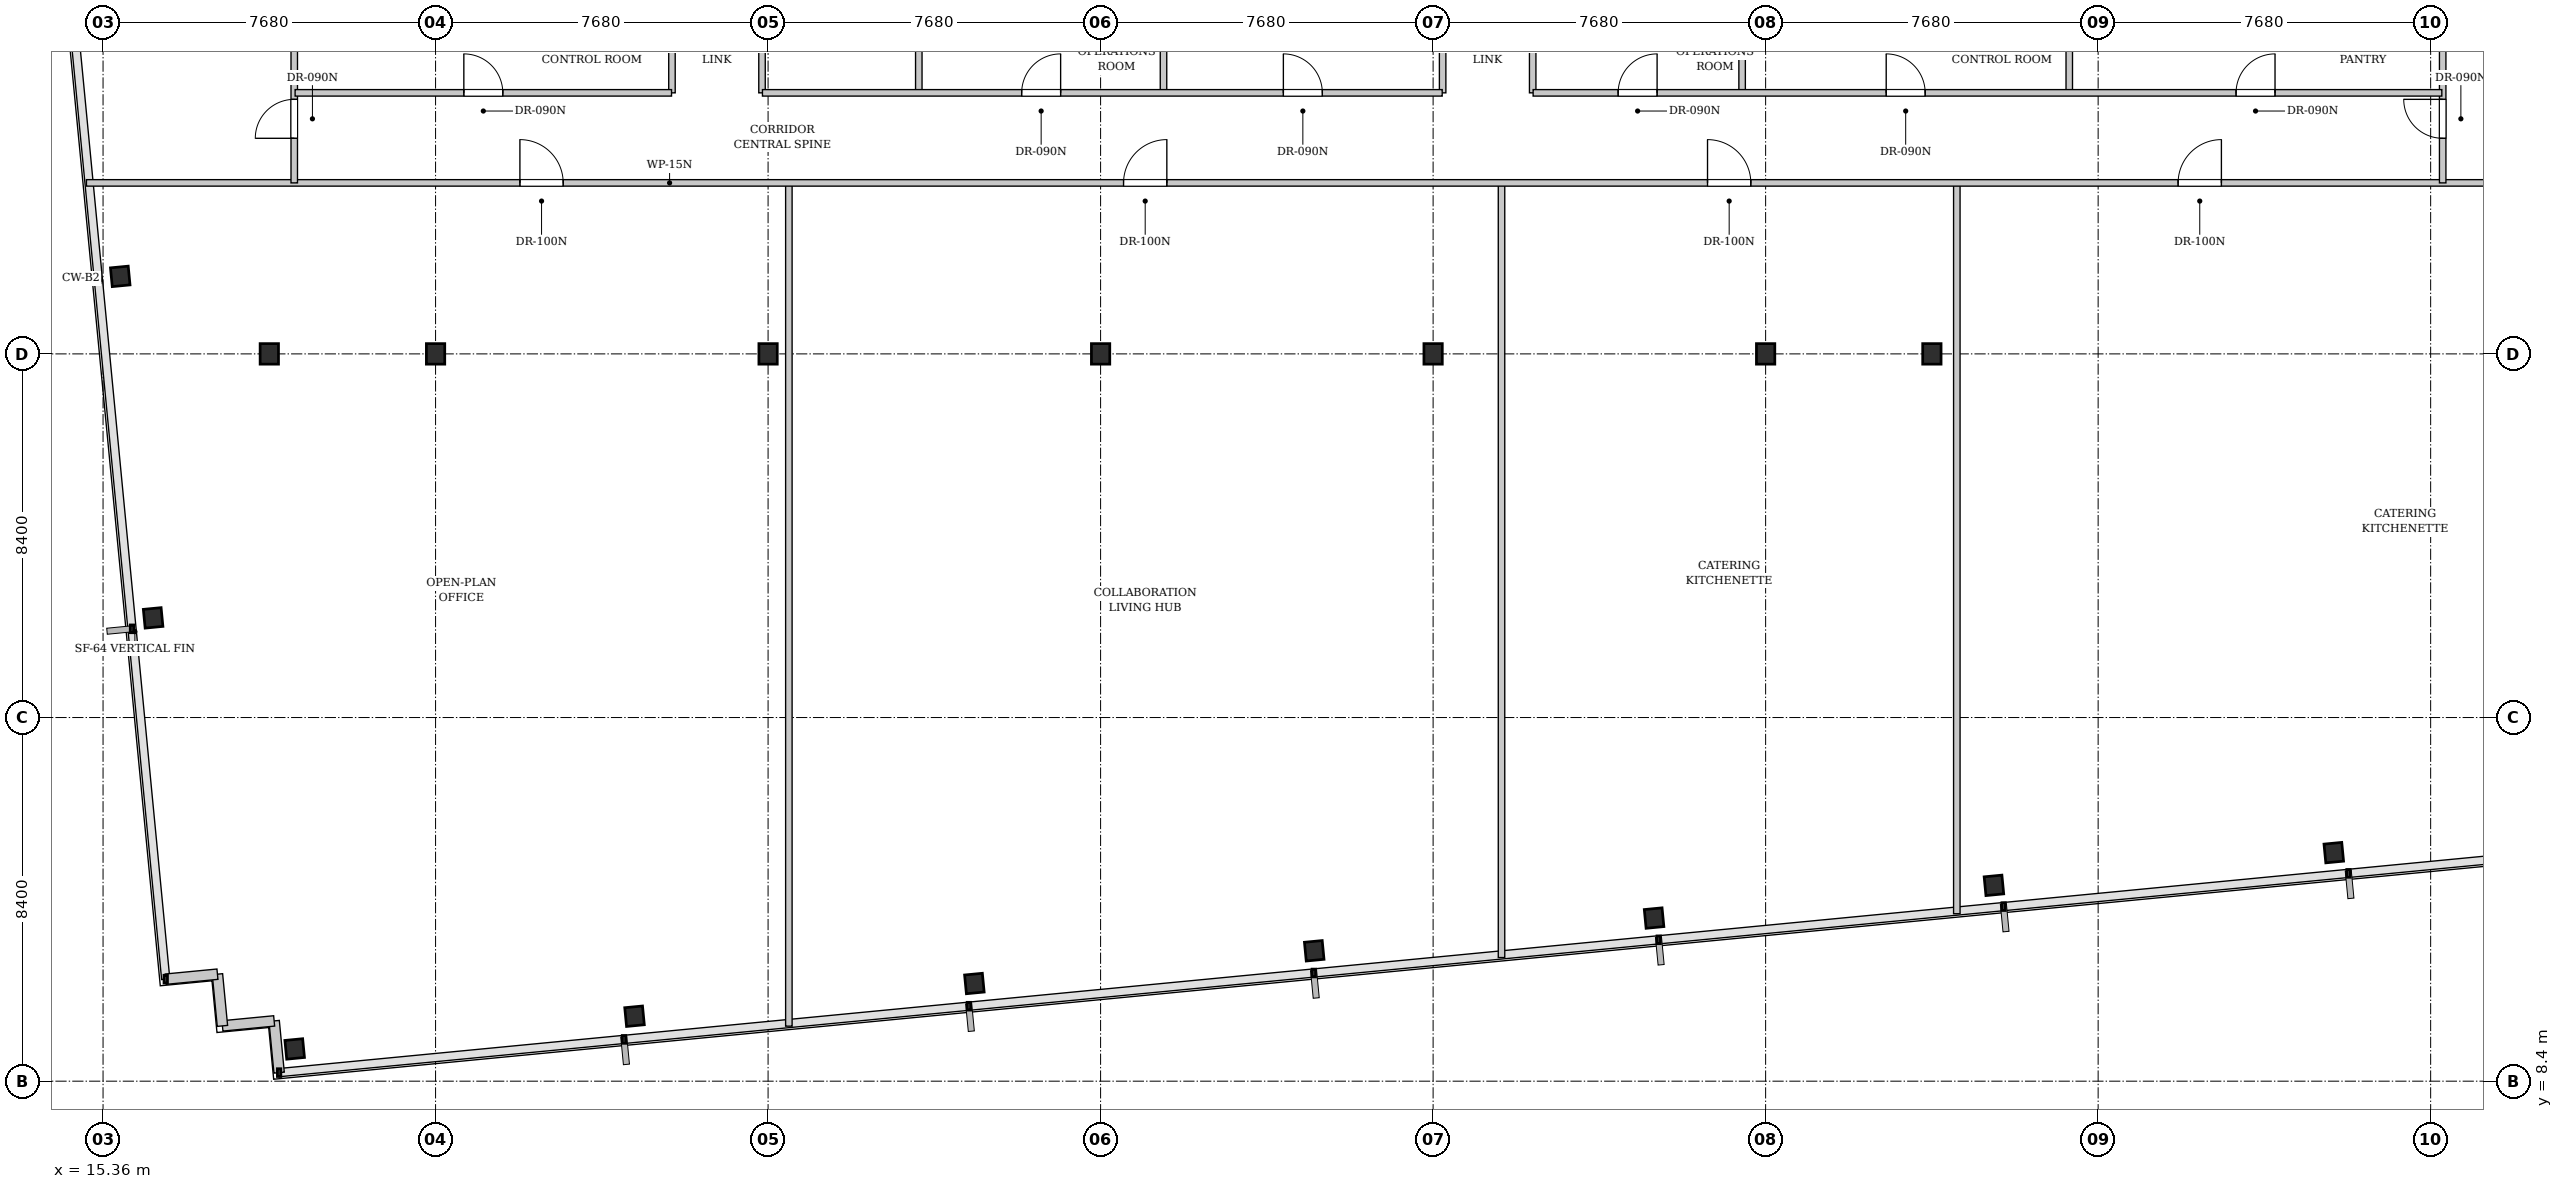
"""IFC4 building model, lengths in metres.
Left out: names, types, materials, properties, quantities, classifications, styles, units other than length and angle.
Written with IfcOpenShell. Run it as: python <this file> out.ifc"""

import sys

from ifc_helpers import new_model, si_unit, direction, frame, frame_2d, origin, origin_2d, place, context, subcontext, project, spatial, rectangle, i_section, extrude, element, fill, save


model = new_model("IFC4")
c1 = context("Model", 3, precision=1e-05, world=origin(), true_north=direction((0.0, 1.0)))
c2 = subcontext(c1, "Body", "Model", "MODEL_VIEW")
j1 = project(units=[si_unit("LENGTHUNIT", "METRE"), si_unit("PLANEANGLEUNIT", "RADIAN")], contexts=[c1])
p1 = place(None, origin())
s1 = spatial("IfcSite", under=j1, at=p1, CompositionType="ELEMENT")
p2 = place(p1, origin())
s2 = spatial("IfcBuilding", under=s1, at=p2, CompositionType="ELEMENT")
p3 = place(p2, frame((0.0, 0.0, 113.5)))
s3 = spatial("IfcBuildingStorey", under=s2, at=p3, CompositionType="ELEMENT", Elevation=113.5)
for number, where, z_axis, x_axis in (
    (1, (23.04, 25.2, 0.0), (0.0, 0.0, 1.0), (1.0, 0.0, 0.0)),
    (2, (30.72, 25.2, 0.0), (0.0, 0.0, 1.0), (1.0, 0.0, 0.0)),
    (3, (38.4, 25.2, 0.0), (0.0, 0.0, 1.0), (1.0, 0.0, 0.0)),
    (4, (46.08, 25.2, 0.0), (0.0, 0.0, 1.0), (1.0, 0.0, 0.0)),
    (5, (53.76, 25.2, 0.0), (0.0, 0.0, 1.0), (1.0, 0.0, 0.0)),
    (6, (19.2, 25.2, 0.0), (0.0, 0.0, 1.0), (1.0, 0.0, 0.0)),
    (7, (57.6, 25.2, 0.0), (0.0, 0.0, 1.0), (1.0, 0.0, 0.0)),
):
    element("IfcColumn", number, at=place(p3, frame(where, z_axis=z_axis, x_axis=x_axis)), inside=s3, PredefinedType="COLUMN", context=c2, shape_type="SweptSolid", body=[
        extrude(i_section(OverallWidth=0.424, OverallDepth=0.474, WebThickness=0.047, FlangeThickness=0.077, FilletRadius=0.015, at=origin_2d()), origin(), (0.0, 0.0, 1.0), 3.4),
    ])
for number, where, z_axis, x_axis in (
    (8, (19.786, 9.144, 0.0), (0.0, 0.0, 1.0), (0.995, 0.096, 0.0)),
    (9, (27.635, 9.9, 0.0), (0.0, 0.0, 1.0), (0.995, 0.096, 0.0)),
    (10, (35.485, 10.656, 0.0), (0.0, 0.0, 1.0), (0.995, 0.096, 0.0)),
    (11, (43.334, 11.412, 0.0), (0.0, 0.0, 1.0), (0.995, 0.096, 0.0)),
    (12, (51.184, 12.167, 0.0), (0.0, 0.0, 1.0), (0.995, 0.096, 0.0)),
    (13, (59.033, 12.923, 0.0), (0.0, 0.0, 1.0), (0.995, 0.096, 0.0)),
    (14, (66.883, 13.679, 0.0), (0.0, 0.0, 1.0), (0.995, 0.096, 0.0)),
    (15, (16.517, 19.102, 0.0), (0.0, 0.0, 1.0), (0.995, 0.096, 0.0)),
    (16, (15.757, 26.99, 0.0), (0.0, 0.0, 1.0), (0.995, 0.096, 0.0)),
):
    element("IfcColumn", number, at=place(p3, frame(where, z_axis=z_axis, x_axis=x_axis)), inside=s3, PredefinedType="COLUMN", context=c2, shape_type="SweptSolid", body=[
        extrude(i_section(OverallWidth=0.412, OverallDepth=0.435, WebThickness=0.036, FlangeThickness=0.058, FilletRadius=0.015, at=origin_2d()), origin(), (0.0, 0.0, 1.0), 3.4),
    ])
for number, where, z_axis, x_axis in (
    (17, (19.427, 8.597, 0.0), (0.0, 0.0, 1.0), (-0.096, 0.995, 0.0)),
    (18, (19.312, 9.792, 0.0), (0.0, 0.0, 1.0), (-0.995, -0.096, 0.0)),
):
    element("IfcWall", number, at=place(p3, frame(where, z_axis=z_axis, x_axis=x_axis)), inside=s3, PredefinedType="SOLIDWALL", context=c2, shape_type="SweptSolid", body=[
        extrude(rectangle(XDim=1.2, YDim=0.24, at=frame_2d((0.6, 0.0))), origin(), (0.0, 0.0, 1.0), 3.18),
    ])
p4 = place(p3, frame((18.117, 9.677, 0.0), z_axis=(0.0, 0.0, 1.0), x_axis=(-0.095836473879, 0.995397091755, 0.0)))
e19 = element("IfcWall", 19, at=p4, inside=s3, PredefinedType="SOLIDWALL", context=c2, shape_type="SweptSolid", body=[
    extrude(rectangle(XDim=1.2, YDim=0.24, at=frame_2d((0.6, 0.0))), origin(), (0.0, 0.0, 1.0), 3.18),
])
p5 = place(p3, frame((18.002, 10.871, 0.0), z_axis=(0.0, 0.0, 1.0), x_axis=(-0.995398960025, -0.095817067274, 0.0)))
e20 = element("IfcWall", 20, at=p5, inside=s3, PredefinedType="SOLIDWALL", context=c2, shape_type="SweptSolid", body=[
    extrude(rectangle(XDim=1.2, YDim=0.24, at=frame_2d((0.6, 0.0))), origin(), (0.0, 0.0, 1.0), 3.18),
])
p6 = place(p3, frame((31.2, 9.671, 0.0), z_axis=(0.0, 0.0, 1.0), x_axis=(0.0, 1.0, 0.0)))
e21 = element("IfcWall", 21, at=p6, inside=s3, PredefinedType="PARTITIONING", context=c2, shape_type="SweptSolid", body=[
    extrude(rectangle(XDim=19.499, YDim=0.15, at=frame_2d((9.75, 0.0))), origin(), (0.0, 0.0, 1.0), 3.18),
])
p7 = place(p3, frame((47.66, 11.256, 0.0), z_axis=(0.0, 0.0, 1.0), x_axis=(0.0, 1.0, 0.0)))
e22 = element("IfcWall", 22, at=p7, inside=s3, PredefinedType="PARTITIONING", context=c2, shape_type="SweptSolid", body=[
    extrude(rectangle(XDim=17.914, YDim=0.15, at=frame_2d((8.957, 0.0))), origin(), (0.0, 0.0, 1.0), 3.18),
])
p8 = place(p3, frame((58.176, 12.268, 0.0), z_axis=(0.0, 0.0, 1.0), x_axis=(0.0, 1.0, 0.0)))
e23 = element("IfcWall", 23, at=p8, inside=s3, PredefinedType="PARTITIONING", context=c2, shape_type="SweptSolid", body=[
    extrude(rectangle(XDim=16.902, YDim=0.15, at=frame_2d((8.451, 0.0))), origin(), (0.0, 0.0, 1.0), 2.525),
])
p9 = place(p3, frame((14.976, 29.15, 0.0), z_axis=(0.0, 0.0, 1.0), x_axis=(1.0, 0.0, 0.0)))
e24 = element("IfcWall", 24, at=p9, inside=s3, PredefinedType="PARTITIONING", context=c2, shape_type="SweptSolid", body=[
    extrude(rectangle(XDim=61.222, YDim=0.15, at=frame_2d((30.611, 0.0))), origin(), (0.0, 0.0, 1.0), 2.525),
])
p10 = place(p9, frame((10.012, 0.0, 0.0)))
e25 = element("IfcOpeningElement", 25, at=p10, cuts=e24, PredefinedType="OPENING", context=c2, shape_type="SweptSolid", body=[
    extrude(rectangle(XDim=1.0, YDim=2.15, at=frame_2d((0.5, 1.075))), frame((0.0, 0.085, 0.0), z_axis=(0.0, -1.0, 0.0), x_axis=(1.0, 0.0, 0.0)), (0.0, 0.0, 1.0), 0.17),
])
p11 = place(p9, frame((23.954, 0.0, 0.0)))
e26 = element("IfcOpeningElement", 26, at=p11, cuts=e24, PredefinedType="OPENING", context=c2, shape_type="SweptSolid", body=[
    extrude(rectangle(XDim=1.0, YDim=2.15, at=frame_2d((0.5, 1.075))), frame((0.0, 0.085, 0.0), z_axis=(0.0, -1.0, 0.0), x_axis=(1.0, 0.0, 0.0)), (0.0, 0.0, 1.0), 0.17),
])
p12 = place(p9, frame((37.442, 0.0, 0.0)))
e27 = element("IfcOpeningElement", 27, at=p12, cuts=e24, PredefinedType="OPENING", context=c2, shape_type="SweptSolid", body=[
    extrude(rectangle(XDim=1.0, YDim=2.15, at=frame_2d((0.5, 1.075))), frame((0.0, 0.085, 0.0), z_axis=(0.0, -1.0, 0.0), x_axis=(1.0, 0.0, 0.0)), (0.0, 0.0, 1.0), 0.17),
])
p13 = place(p9, frame((48.311, 0.0, 0.0)))
e28 = element("IfcOpeningElement", 28, at=p13, cuts=e24, PredefinedType="OPENING", context=c2, shape_type="SweptSolid", body=[
    extrude(rectangle(XDim=1.0, YDim=2.15, at=frame_2d((0.5, 1.075))), frame((0.0, 0.085, 0.0), z_axis=(0.0, -1.0, 0.0), x_axis=(1.0, 0.0, 0.0)), (0.0, 0.0, 1.0), 0.17),
])
p14 = place(p3, frame((19.776, 29.15, 0.0), z_axis=(0.0, 0.0, 1.0), x_axis=(0.0, 1.0, 0.0)))
e29 = element("IfcWall", 29, at=p14, inside=s3, PredefinedType="PARTITIONING", context=c2, shape_type="SweptSolid", body=[
    extrude(rectangle(XDim=17.034, YDim=0.15, at=frame_2d((8.517, 0.0))), origin(), (0.0, 0.0, 1.0), 3.18),
])
p15 = place(p14, frame((1.03, 0.0, 0.0)))
e30 = element("IfcOpeningElement", 30, at=p15, cuts=e29, PredefinedType="OPENING", context=c2, shape_type="SweptSolid", body=[
    extrude(rectangle(XDim=0.9, YDim=2.15, at=frame_2d((0.45, 1.075))), frame((0.0, 0.085, 0.0), z_axis=(0.0, -1.0, 0.0), x_axis=(1.0, 0.0, 0.0)), (0.0, 0.0, 1.0), 0.17),
])
p16 = place(p3, frame((69.398, 29.15, 0.0), z_axis=(0.0, 0.0, 1.0), x_axis=(0.0, 1.0, 0.0)))
e31 = element("IfcWall", 31, at=p16, inside=s3, PredefinedType="PARTITIONING", context=c2, shape_type="SweptSolid", body=[
    extrude(rectangle(XDim=21.812, YDim=0.15, at=frame_2d((10.906, 0.0))), origin(), (0.0, 0.0, 1.0), 3.18),
])
p17 = place(p16, frame((1.03, 0.0, 0.0)))
e32 = element("IfcOpeningElement", 32, at=p17, cuts=e31, PredefinedType="OPENING", context=c2, shape_type="SweptSolid", body=[
    extrude(rectangle(XDim=0.9, YDim=2.15, at=frame_2d((0.45, 1.075))), frame((0.0, 0.085, 0.0), z_axis=(0.0, -1.0, 0.0), x_axis=(1.0, 0.0, 0.0)), (0.0, 0.0, 1.0), 0.17),
])
p18 = place(p3, frame((28.5, 31.23, 0.0), z_axis=(0.0, 0.0, 1.0), x_axis=(0.0, 1.0, 0.0)))
e33 = element("IfcWall", 33, at=p18, inside=s3, PredefinedType="PARTITIONING", context=c2, shape_type="SweptSolid", body=[
    extrude(rectangle(XDim=1.82, YDim=0.15, at=frame_2d((0.91, 0.0))), origin(), (0.0, 0.0, 1.0), 3.18),
])
for number, where, z_axis, x_axis in (
    (34, (30.58, 31.23, 0.0), (0.0, 0.0, 1.0), (0.0, 1.0, 0.0)),
    (35, (46.3, 31.23, 0.0), (0.0, 0.0, 1.0), (0.0, 1.0, 0.0)),
):
    element("IfcWall", number, at=place(p3, frame(where, z_axis=z_axis, x_axis=x_axis)), inside=s3, PredefinedType="PARTITIONING", context=c2, shape_type="SweptSolid", body=[
        extrude(rectangle(XDim=1.82, YDim=0.15, at=frame_2d((0.91, 0.0))), origin(), (0.0, 0.0, 1.0), 2.525),
    ])
p19 = place(p3, frame((48.38, 31.23, 0.0), z_axis=(0.0, 0.0, 1.0), x_axis=(0.0, 1.0, 0.0)))
e36 = element("IfcWall", 36, at=p19, inside=s3, PredefinedType="PARTITIONING", context=c2, shape_type="SweptSolid", body=[
    extrude(rectangle(XDim=1.82, YDim=0.15, at=frame_2d((0.91, 0.0))), origin(), (0.0, 0.0, 1.0), 3.18),
])
p20 = place(p3, frame((19.796, 31.23, 0.0), z_axis=(0.0, 0.0, 1.0), x_axis=(1.0, 0.0, 0.0)))
e37 = element("IfcWall", 37, at=p20, inside=s3, PredefinedType="PARTITIONING", context=c2, shape_type="SweptSolid", body=[
    extrude(rectangle(XDim=8.694, YDim=0.15, at=frame_2d((4.347, 0.0))), origin(), (0.0, 0.0, 1.0), 3.18),
])
p21 = place(p20, frame((3.897, 0.0, 0.0)))
e38 = element("IfcOpeningElement", 38, at=p21, cuts=e37, PredefinedType="OPENING", context=c2, shape_type="SweptSolid", body=[
    extrude(rectangle(XDim=0.9, YDim=2.15, at=frame_2d((0.45, 1.075))), frame((0.0, 0.085, 0.0), z_axis=(0.0, -1.0, 0.0), x_axis=(1.0, 0.0, 0.0)), (0.0, 0.0, 1.0), 0.17),
])
for number, where, z_axis, x_axis in (
    (39, (34.201, 31.23, 0.0), (0.0, 0.0, 1.0), (0.0, 1.0, 0.0)),
    (40, (39.853, 31.23, 0.0), (0.0, 0.0, 1.0), (0.0, 1.0, 0.0)),
):
    element("IfcWall", number, at=place(p3, frame(where, z_axis=z_axis, x_axis=x_axis)), inside=s3, PredefinedType="PARTITIONING", context=c2, shape_type="SweptSolid", body=[
        extrude(rectangle(XDim=1.82, YDim=0.15, at=frame_2d((0.91, 0.0))), origin(), (0.0, 0.0, 1.0), 3.18),
    ])
p22 = place(p3, frame((30.59, 31.23, 0.0), z_axis=(0.0, 0.0, 1.0), x_axis=(1.0, 0.0, 0.0)))
e41 = element("IfcWall", 41, at=p22, inside=s3, PredefinedType="PARTITIONING", context=c2, shape_type="SweptSolid", body=[
    extrude(rectangle(XDim=15.7, YDim=0.15, at=frame_2d((7.85, 0.0))), origin(), (0.0, 0.0, 1.0), 3.18),
])
p23 = place(p22, frame((5.987, 0.0, 0.0)))
e42 = element("IfcOpeningElement", 42, at=p23, cuts=e41, PredefinedType="OPENING", context=c2, shape_type="SweptSolid", body=[
    extrude(rectangle(XDim=0.9, YDim=2.15, at=frame_2d((0.45, 1.075))), frame((0.0, 0.085, 0.0), z_axis=(0.0, -1.0, 0.0), x_axis=(1.0, 0.0, 0.0)), (0.0, 0.0, 1.0), 0.17),
])
p24 = place(p22, frame((12.031, 0.0, 0.0)))
e43 = element("IfcOpeningElement", 43, at=p24, cuts=e41, PredefinedType="OPENING", context=c2, shape_type="SweptSolid", body=[
    extrude(rectangle(XDim=0.9, YDim=2.15, at=frame_2d((0.45, 1.075))), frame((0.0, 0.085, 0.0), z_axis=(0.0, -1.0, 0.0), x_axis=(1.0, 0.0, 0.0)), (0.0, 0.0, 1.0), 0.17),
])
for number, where, z_axis, x_axis in (
    (44, (53.217, 31.23, 0.0), (0.0, 0.0, 1.0), (0.0, 1.0, 0.0)),
    (45, (60.773, 31.23, 0.0), (0.0, 0.0, 1.0), (0.0, 1.0, 0.0)),
):
    element("IfcWall", number, at=place(p3, frame(where, z_axis=z_axis, x_axis=x_axis)), inside=s3, PredefinedType="PARTITIONING", context=c2, shape_type="SweptSolid", body=[
        extrude(rectangle(XDim=1.82, YDim=0.15, at=frame_2d((0.91, 0.0))), origin(), (0.0, 0.0, 1.0), 3.18),
    ])
p25 = place(p3, frame((48.39, 31.23, 0.0), z_axis=(0.0, 0.0, 1.0), x_axis=(1.0, 0.0, 0.0)))
e46 = element("IfcWall", 46, at=p25, inside=s3, PredefinedType="PARTITIONING", context=c2, shape_type="SweptSolid", body=[
    extrude(rectangle(XDim=20.988, YDim=0.15, at=frame_2d((10.494, 0.0))), origin(), (0.0, 0.0, 1.0), 2.525),
])
p26 = place(p25, frame((1.963, 0.0, 0.0)))
e47 = element("IfcOpeningElement", 47, at=p26, cuts=e46, PredefinedType="OPENING", context=c2, shape_type="SweptSolid", body=[
    extrude(rectangle(XDim=0.9, YDim=2.15, at=frame_2d((0.45, 1.075))), frame((0.0, 0.085, 0.0), z_axis=(0.0, -1.0, 0.0), x_axis=(1.0, 0.0, 0.0)), (0.0, 0.0, 1.0), 0.17),
])
p27 = place(p25, frame((8.155, 0.0, 0.0)))
e48 = element("IfcOpeningElement", 48, at=p27, cuts=e46, PredefinedType="OPENING", context=c2, shape_type="SweptSolid", body=[
    extrude(rectangle(XDim=0.9, YDim=2.15, at=frame_2d((0.45, 1.075))), frame((0.0, 0.085, 0.0), z_axis=(0.0, -1.0, 0.0), x_axis=(1.0, 0.0, 0.0)), (0.0, 0.0, 1.0), 0.17),
])
p28 = place(p25, frame((16.236, 0.0, 0.0)))
e49 = element("IfcOpeningElement", 49, at=p28, cuts=e46, PredefinedType="OPENING", context=c2, shape_type="SweptSolid", body=[
    extrude(rectangle(XDim=0.9, YDim=2.15, at=frame_2d((0.45, 1.075))), frame((0.0, 0.085, 0.0), z_axis=(0.0, -1.0, 0.0), x_axis=(1.0, 0.0, 0.0)), (0.0, 0.0, 1.0), 0.17),
])
p29 = place(p10, origin())
e50 = element("IfcDoor", 50, at=p29, inside=s3, OperationType="SINGLE_SWING_LEFT", PredefinedType="DOOR", context=c2, shape_type="SweptSolid", body=[
    extrude(rectangle(XDim=1.0, YDim=2.15, at=frame_2d((0.5, 1.075))), frame((0.0, 0.025, 0.0), z_axis=(0.0, -1.0, 0.0), x_axis=(1.0, 0.0, 0.0)), (0.0, 0.0, 1.0), 0.05),
])
fill(e25, e50)
p30 = place(p11, origin())
e51 = element("IfcDoor", 51, at=p30, inside=s3, OperationType="SINGLE_SWING_RIGHT", PredefinedType="DOOR", context=c2, shape_type="SweptSolid", body=[
    extrude(rectangle(XDim=1.0, YDim=2.15, at=frame_2d((0.5, 1.075))), frame((0.0, 0.025, 0.0), z_axis=(0.0, -1.0, 0.0), x_axis=(1.0, 0.0, 0.0)), (0.0, 0.0, 1.0), 0.05),
])
fill(e26, e51)
p31 = place(p12, origin())
e52 = element("IfcDoor", 52, at=p31, inside=s3, OperationType="SINGLE_SWING_LEFT", PredefinedType="DOOR", context=c2, shape_type="SweptSolid", body=[
    extrude(rectangle(XDim=1.0, YDim=2.15, at=frame_2d((0.5, 1.075))), frame((0.0, 0.025, 0.0), z_axis=(0.0, -1.0, 0.0), x_axis=(1.0, 0.0, 0.0)), (0.0, 0.0, 1.0), 0.05),
])
fill(e27, e52)
p32 = place(p13, origin())
e53 = element("IfcDoor", 53, at=p32, inside=s3, OperationType="SINGLE_SWING_RIGHT", PredefinedType="DOOR", context=c2, shape_type="SweptSolid", body=[
    extrude(rectangle(XDim=1.0, YDim=2.15, at=frame_2d((0.5, 1.075))), frame((0.0, 0.025, 0.0), z_axis=(0.0, -1.0, 0.0), x_axis=(1.0, 0.0, 0.0)), (0.0, 0.0, 1.0), 0.05),
])
fill(e28, e53)
p33 = place(p15, origin())
e54 = element("IfcDoor", 54, at=p33, inside=s3, OperationType="SINGLE_SWING_LEFT", PredefinedType="DOOR", context=c2, shape_type="SweptSolid", body=[
    extrude(rectangle(XDim=0.9, YDim=2.15, at=frame_2d((0.45, 1.075))), frame((0.0, 0.025, 0.0), z_axis=(0.0, -1.0, 0.0), x_axis=(1.0, 0.0, 0.0)), (0.0, 0.0, 1.0), 0.05),
])
fill(e30, e54)
p34 = place(p17, origin())
e55 = element("IfcDoor", 55, at=p34, inside=s3, OperationType="SINGLE_SWING_RIGHT", PredefinedType="DOOR", context=c2, shape_type="SweptSolid", body=[
    extrude(rectangle(XDim=0.9, YDim=2.15, at=frame_2d((0.45, 1.075))), frame((0.0, 0.025, 0.0), z_axis=(0.0, -1.0, 0.0), x_axis=(1.0, 0.0, 0.0)), (0.0, 0.0, 1.0), 0.05),
])
fill(e32, e55)
p35 = place(p21, origin())
e56 = element("IfcDoor", 56, at=p35, inside=s3, OperationType="SINGLE_SWING_LEFT", PredefinedType="DOOR", context=c2, shape_type="SweptSolid", body=[
    extrude(rectangle(XDim=0.9, YDim=2.15, at=frame_2d((0.45, 1.075))), frame((0.0, 0.025, 0.0), z_axis=(0.0, -1.0, 0.0), x_axis=(1.0, 0.0, 0.0)), (0.0, 0.0, 1.0), 0.05),
])
fill(e38, e56)
p36 = place(p23, origin())
e57 = element("IfcDoor", 57, at=p36, inside=s3, OperationType="SINGLE_SWING_RIGHT", PredefinedType="DOOR", context=c2, shape_type="SweptSolid", body=[
    extrude(rectangle(XDim=0.9, YDim=2.15, at=frame_2d((0.45, 1.075))), frame((0.0, 0.025, 0.0), z_axis=(0.0, -1.0, 0.0), x_axis=(1.0, 0.0, 0.0)), (0.0, 0.0, 1.0), 0.05),
])
fill(e42, e57)
p37 = place(p24, origin())
e58 = element("IfcDoor", 58, at=p37, inside=s3, OperationType="SINGLE_SWING_LEFT", PredefinedType="DOOR", context=c2, shape_type="SweptSolid", body=[
    extrude(rectangle(XDim=0.9, YDim=2.15, at=frame_2d((0.45, 1.075))), frame((0.0, 0.025, 0.0), z_axis=(0.0, -1.0, 0.0), x_axis=(1.0, 0.0, 0.0)), (0.0, 0.0, 1.0), 0.05),
])
fill(e43, e58)
p38 = place(p26, origin())
e59 = element("IfcDoor", 59, at=p38, inside=s3, OperationType="SINGLE_SWING_RIGHT", PredefinedType="DOOR", context=c2, shape_type="SweptSolid", body=[
    extrude(rectangle(XDim=0.9, YDim=2.15, at=frame_2d((0.45, 1.075))), frame((0.0, 0.025, 0.0), z_axis=(0.0, -1.0, 0.0), x_axis=(1.0, 0.0, 0.0)), (0.0, 0.0, 1.0), 0.05),
])
fill(e47, e59)
p39 = place(p27, origin())
e60 = element("IfcDoor", 60, at=p39, inside=s3, OperationType="SINGLE_SWING_LEFT", PredefinedType="DOOR", context=c2, shape_type="SweptSolid", body=[
    extrude(rectangle(XDim=0.9, YDim=2.15, at=frame_2d((0.45, 1.075))), frame((0.0, 0.025, 0.0), z_axis=(0.0, -1.0, 0.0), x_axis=(1.0, 0.0, 0.0)), (0.0, 0.0, 1.0), 0.05),
])
fill(e48, e60)
p40 = place(p28, origin())
e61 = element("IfcDoor", 61, at=p40, inside=s3, OperationType="SINGLE_SWING_RIGHT", PredefinedType="DOOR", context=c2, shape_type="SweptSolid", body=[
    extrude(rectangle(XDim=0.9, YDim=2.15, at=frame_2d((0.45, 1.075))), frame((0.0, 0.025, 0.0), z_axis=(0.0, -1.0, 0.0), x_axis=(1.0, 0.0, 0.0)), (0.0, 0.0, 1.0), 0.05),
])
fill(e49, e61)
save(model, sys.argv[1])
